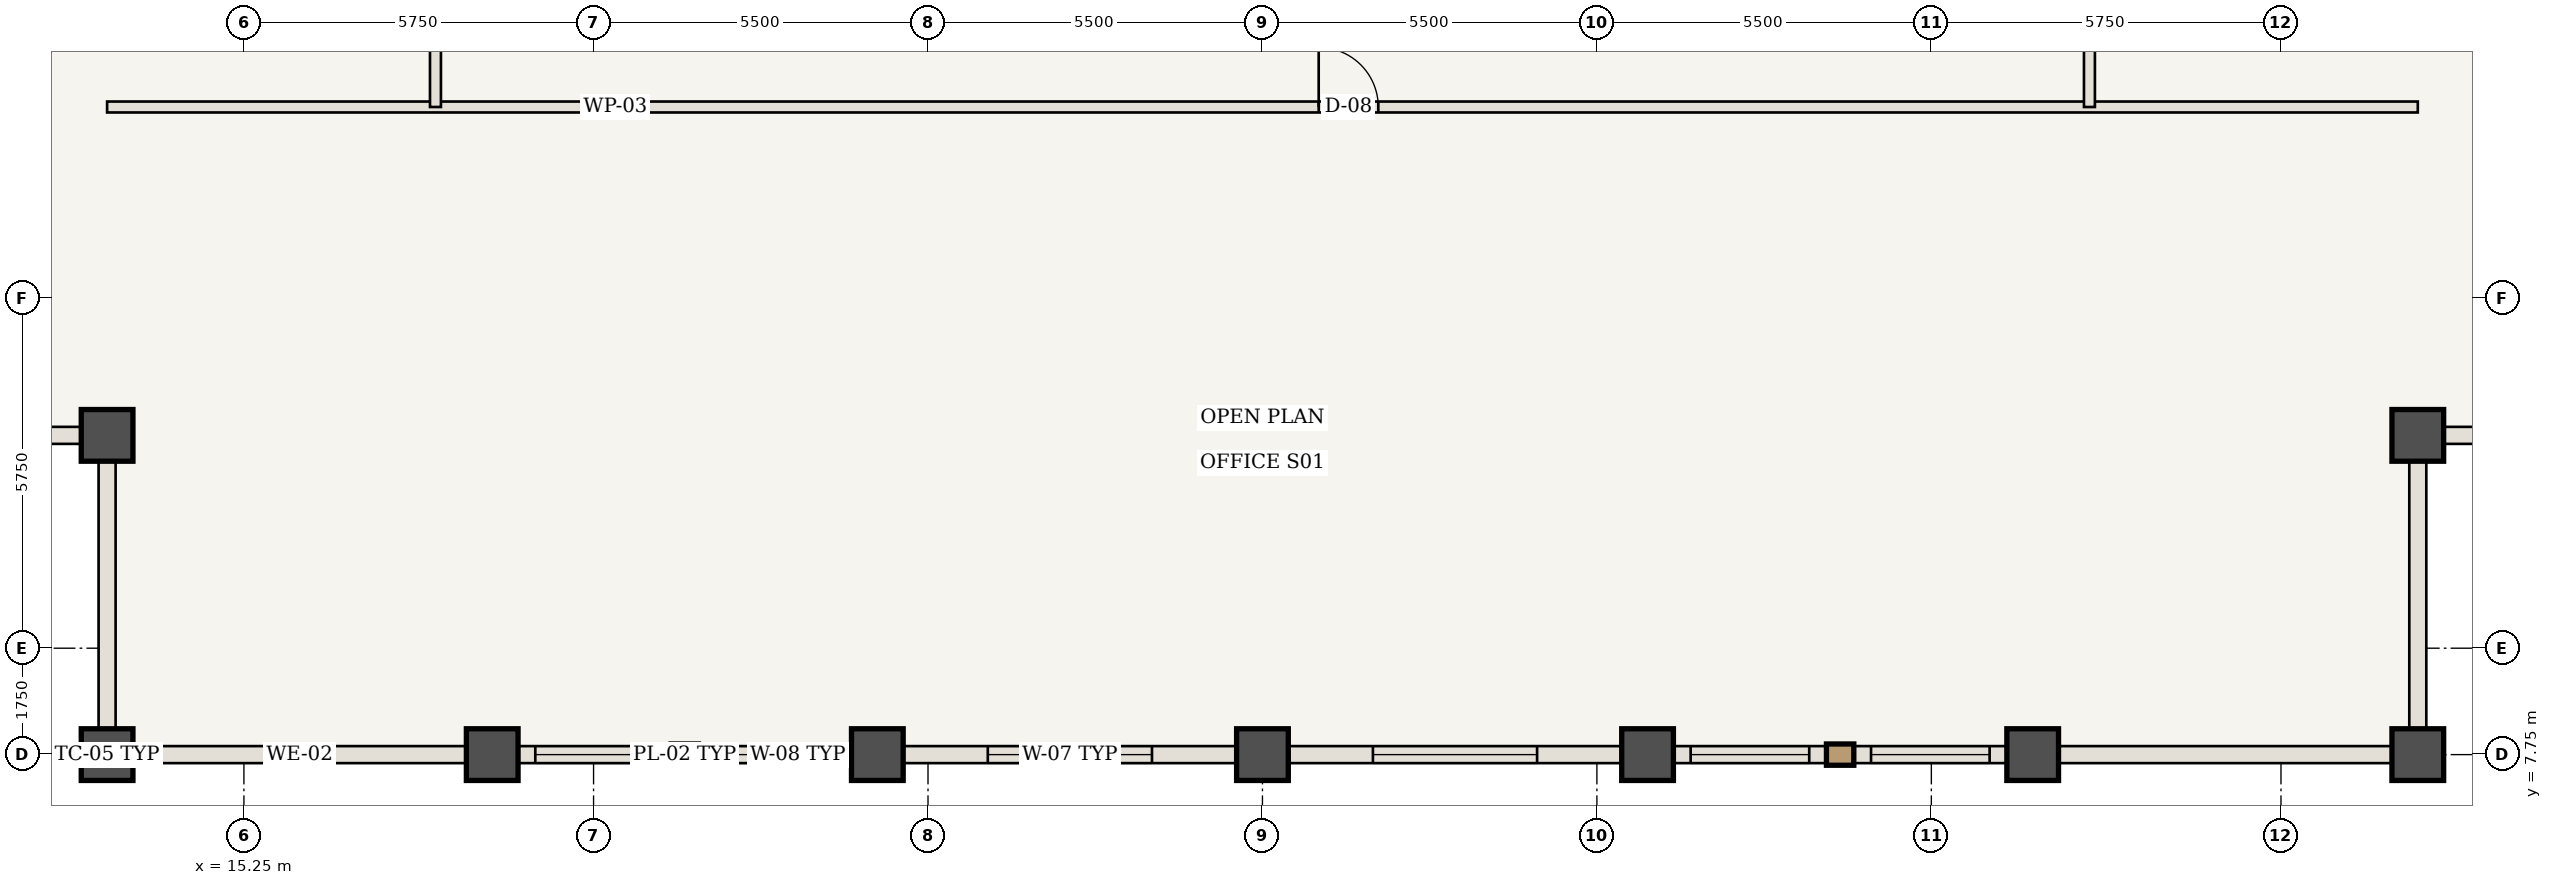
"""IFC4 building model, lengths in metres.
Left out: names, types, materials, properties, quantities, classifications, styles, units other than length and angle.
Written with IfcOpenShell. Run it as: python <this file> out.ifc"""

import sys

from ifc_helpers import new_model, si_unit, direction, frame, frame_2d, origin, origin_2d, place, context, subcontext, project, spatial, rectangle, extrude, element, fill, save


model = new_model("IFC4")
c1 = context("Model", 3, precision=1e-05, world=origin(), true_north=direction((0.0, 1.0)))
c2 = subcontext(c1, "Body", "Model", "MODEL_VIEW")
j1 = project(units=[si_unit("LENGTHUNIT", "METRE"), si_unit("PLANEANGLEUNIT", "RADIAN")], contexts=[c1])
p1 = place(None, origin())
s1 = spatial("IfcSite", under=j1, at=p1, CompositionType="ELEMENT")
p2 = place(p1, origin())
s2 = spatial("IfcBuilding", under=s1, at=p2, CompositionType="ELEMENT")
p3 = place(p2, frame((0.0, 0.0, 190.75)))
s3 = spatial("IfcBuildingStorey", under=s2, at=p3, CompositionType="ELEMENT", Elevation=190.75)
for number, where, z_axis, x_axis in (
    (1, (13.0, 7.75, 0.0), (0.0, 0.0, 1.0), (1.0, 0.0, 0.0)),
    (2, (13.0, 13.0, 0.0), (0.0, 0.0, 1.0), (1.0, 0.0, 0.0)),
    (3, (51.0, 7.75, 0.0), (0.0, 0.0, 1.0), (1.0, 0.0, 0.0)),
    (4, (51.0, 13.0, 0.0), (0.0, 0.0, 1.0), (1.0, 0.0, 0.0)),
    (5, (19.333, 7.75, 0.0), (0.0, 0.0, 1.0), (1.0, 0.0, 0.0)),
    (6, (25.667, 7.75, 0.0), (0.0, 0.0, 1.0), (1.0, 0.0, 0.0)),
    (7, (32.0, 7.75, 0.0), (0.0, 0.0, 1.0), (1.0, 0.0, 0.0)),
    (8, (38.333, 7.75, 0.0), (0.0, 0.0, 1.0), (1.0, 0.0, 0.0)),
    (9, (44.667, 7.75, 0.0), (0.0, 0.0, 1.0), (1.0, 0.0, 0.0)),
):
    element("IfcColumn", number, at=place(p3, frame(where, z_axis=z_axis, x_axis=x_axis)), inside=s3, PredefinedType="COLUMN", context=c2, shape_type="SweptSolid", body=[
        extrude(rectangle(XDim=0.85, YDim=0.85, at=origin_2d()), origin(), (0.0, 0.0, 1.0), 3.85),
    ])
p4 = place(p3, frame((13.0, 18.4, 0.0), z_axis=(0.0, 0.0, 1.0), x_axis=(1.0, 0.0, 0.0)))
e10 = element("IfcWall", 10, at=p4, inside=s3, PredefinedType="STANDARD", context=c2, shape_type="SweptSolid", body=[
    extrude(rectangle(XDim=38.0, YDim=0.18, at=frame_2d((19.0, 0.0))), origin(), (0.0, 0.0, 1.0), 3.685),
])
p5 = place(p4, frame((19.925, 0.0, 0.0)))
e11 = element("IfcOpeningElement", 11, at=p5, cuts=e10, PredefinedType="OPENING", context=c2, shape_type="SweptSolid", body=[
    extrude(rectangle(XDim=0.98, YDim=2.2, at=frame_2d((0.49, 1.1))), frame((0.0, 0.1, 0.0), z_axis=(0.0, -1.0, 0.0), x_axis=(1.0, 0.0, 0.0)), (0.0, 0.0, 1.0), 0.2),
])
p6 = place(p3, frame((18.4, 18.4, 0.0), z_axis=(0.0, 0.0, 1.0), x_axis=(0.0, 1.0, 0.0)))
e12 = element("IfcWall", 12, at=p6, inside=s3, PredefinedType="STANDARD", context=c2, shape_type="SweptSolid", body=[
    extrude(rectangle(XDim=6.317, YDim=0.18, at=frame_2d((3.158, 0.0))), origin(), (0.0, 0.0, 1.0), 3.685),
])
p7 = place(p6, frame((1.208, 0.0, 0.0)))
e13 = element("IfcOpeningElement", 13, at=p7, cuts=e12, PredefinedType="OPENING", context=c2, shape_type="SweptSolid", body=[
    extrude(rectangle(XDim=0.98, YDim=2.2, at=frame_2d((0.49, 1.1))), frame((0.0, 0.1, 0.0), z_axis=(0.0, -1.0, 0.0), x_axis=(1.0, 0.0, 0.0)), (0.0, 0.0, 1.0), 0.2),
])
p8 = place(p3, frame((45.6, 18.4, 0.0), z_axis=(0.0, 0.0, 1.0), x_axis=(0.0, 1.0, 0.0)))
e14 = element("IfcWall", 14, at=p8, inside=s3, PredefinedType="STANDARD", context=c2, shape_type="SweptSolid", body=[
    extrude(rectangle(XDim=13.4, YDim=0.18, at=frame_2d((6.7, 0.0))), origin(), (0.0, 0.0, 1.0), 3.685),
])
p9 = place(p8, frame((6.2, 0.0, 0.0)))
e15 = element("IfcOpeningElement", 15, at=p9, cuts=e14, PredefinedType="OPENING", context=c2, shape_type="SweptSolid", body=[
    extrude(rectangle(XDim=0.98, YDim=2.2, at=frame_2d((0.49, 1.1))), frame((0.0, 0.1, 0.0), z_axis=(0.0, -1.0, 0.0), x_axis=(1.0, 0.0, 0.0)), (0.0, 0.0, 1.0), 0.2),
])
p10 = place(p3, frame((19.333, 7.75, 0.0), z_axis=(0.0, 0.0, 1.0), x_axis=(-1.0, 0.0, 0.0)))
e16 = element("IfcWall", 16, at=p10, inside=s3, PredefinedType="USERDEFINED", context=c2, shape_type="SweptSolid", body=[
    extrude(rectangle(XDim=6.333, YDim=0.28, at=frame_2d((3.167, 0.0))), origin(), (0.0, 0.0, 1.0), 2.985),
])
p11 = place(p3, frame((25.667, 7.75, 0.0), z_axis=(0.0, 0.0, 1.0), x_axis=(-1.0, 0.0, 0.0)))
e17 = element("IfcWall", 17, at=p11, inside=s3, PredefinedType="USERDEFINED", context=c2, shape_type="SweptSolid", body=[
    extrude(rectangle(XDim=6.333, YDim=0.28, at=frame_2d((3.167, 0.0))), origin(), (0.0, 0.0, 1.0), 2.985),
])
p12 = place(p11, frame((0.708, 0.0, 0.85)))
e18 = element("IfcOpeningElement", 18, at=p12, cuts=e17, PredefinedType="OPENING", context=c2, shape_type="SweptSolid", body=[
    extrude(rectangle(XDim=1.95, YDim=1.935, at=frame_2d((0.975, 0.968))), frame((0.0, 0.15, 0.0), z_axis=(0.0, -1.0, 0.0), x_axis=(1.0, 0.0, 0.0)), (0.0, 0.0, 1.0), 0.3),
])
p13 = place(p11, frame((3.675, 0.0, 0.85)))
e19 = element("IfcOpeningElement", 19, at=p13, cuts=e17, PredefinedType="OPENING", context=c2, shape_type="SweptSolid", body=[
    extrude(rectangle(XDim=1.95, YDim=1.935, at=frame_2d((0.975, 0.968))), frame((0.0, 0.15, 0.0), z_axis=(0.0, -1.0, 0.0), x_axis=(1.0, 0.0, 0.0)), (0.0, 0.0, 1.0), 0.3),
])
p14 = place(p3, frame((32.0, 7.75, 0.0), z_axis=(0.0, 0.0, 1.0), x_axis=(-1.0, 0.0, 0.0)))
e20 = element("IfcWall", 20, at=p14, inside=s3, PredefinedType="USERDEFINED", context=c2, shape_type="SweptSolid", body=[
    extrude(rectangle(XDim=6.333, YDim=0.28, at=frame_2d((3.167, 0.0))), origin(), (0.0, 0.0, 1.0), 2.985),
])
p15 = place(p14, frame((1.817, 0.0, 0.85)))
e21 = element("IfcOpeningElement", 21, at=p15, cuts=e20, PredefinedType="OPENING", context=c2, shape_type="SweptSolid", body=[
    extrude(rectangle(XDim=2.7, YDim=1.935, at=frame_2d((1.35, 0.968))), frame((0.0, 0.15, 0.0), z_axis=(0.0, -1.0, 0.0), x_axis=(1.0, 0.0, 0.0)), (0.0, 0.0, 1.0), 0.3),
])
p16 = place(p3, frame((38.333, 7.75, 0.0), z_axis=(0.0, 0.0, 1.0), x_axis=(-1.0, 0.0, 0.0)))
e22 = element("IfcWall", 22, at=p16, inside=s3, PredefinedType="USERDEFINED", context=c2, shape_type="SweptSolid", body=[
    extrude(rectangle(XDim=6.333, YDim=0.28, at=frame_2d((3.167, 0.0))), origin(), (0.0, 0.0, 1.0), 2.985),
])
p17 = place(p16, frame((1.817, 0.0, 0.85)))
e23 = element("IfcOpeningElement", 23, at=p17, cuts=e22, PredefinedType="OPENING", context=c2, shape_type="SweptSolid", body=[
    extrude(rectangle(XDim=2.7, YDim=1.935, at=frame_2d((1.35, 0.968))), frame((0.0, 0.15, 0.0), z_axis=(0.0, -1.0, 0.0), x_axis=(1.0, 0.0, 0.0)), (0.0, 0.0, 1.0), 0.3),
])
p18 = place(p3, frame((44.667, 7.75, 0.0), z_axis=(0.0, 0.0, 1.0), x_axis=(-1.0, 0.0, 0.0)))
e24 = element("IfcWall", 24, at=p18, inside=s3, PredefinedType="USERDEFINED", context=c2, shape_type="SweptSolid", body=[
    extrude(rectangle(XDim=6.333, YDim=0.28, at=frame_2d((3.167, 0.0))), origin(), (0.0, 0.0, 1.0), 2.985),
])
p19 = place(p18, frame((0.708, 0.0, 0.85)))
e25 = element("IfcOpeningElement", 25, at=p19, cuts=e24, PredefinedType="OPENING", context=c2, shape_type="SweptSolid", body=[
    extrude(rectangle(XDim=1.95, YDim=1.935, at=frame_2d((0.975, 0.968))), frame((0.0, 0.15, 0.0), z_axis=(0.0, -1.0, 0.0), x_axis=(1.0, 0.0, 0.0)), (0.0, 0.0, 1.0), 0.3),
])
p20 = place(p18, frame((3.675, 0.0, 0.85)))
e26 = element("IfcOpeningElement", 26, at=p20, cuts=e24, PredefinedType="OPENING", context=c2, shape_type="SweptSolid", body=[
    extrude(rectangle(XDim=1.95, YDim=1.935, at=frame_2d((0.975, 0.968))), frame((0.0, 0.15, 0.0), z_axis=(0.0, -1.0, 0.0), x_axis=(1.0, 0.0, 0.0)), (0.0, 0.0, 1.0), 0.3),
])
p21 = place(p3, frame((51.0, 7.75, 0.0), z_axis=(0.0, 0.0, 1.0), x_axis=(-1.0, 0.0, 0.0)))
e27 = element("IfcWall", 27, at=p21, inside=s3, PredefinedType="USERDEFINED", context=c2, shape_type="SweptSolid", body=[
    extrude(rectangle(XDim=6.333, YDim=0.28, at=frame_2d((3.167, 0.0))), origin(), (0.0, 0.0, 1.0), 2.985),
])
for number, where, z_axis, x_axis in (
    (28, (13.0, 7.75, 0.0), (0.0, 0.0, 1.0), (0.0, 1.0, 0.0)),
    (29, (13.0, 13.0, 0.0), (0.0, 0.0, 1.0), (-1.0, 0.0, 0.0)),
    (30, (51.0, 13.0, 0.0), (0.0, 0.0, 1.0), (0.0, -1.0, 0.0)),
    (31, (56.25, 13.0, 0.0), (0.0, 0.0, 1.0), (-1.0, 0.0, 0.0)),
):
    element("IfcWall", number, at=place(p3, frame(where, z_axis=z_axis, x_axis=x_axis)), inside=s3, PredefinedType="USERDEFINED", context=c2, shape_type="SweptSolid", body=[
        extrude(rectangle(XDim=5.25, YDim=0.28, at=frame_2d((2.625, 0.0))), origin(), (0.0, 0.0, 1.0), 2.985),
    ])
p22 = place(p5, origin())
e32 = element("IfcDoor", 32, at=p22, inside=s3, OperationType="SINGLE_SWING_LEFT", PredefinedType="DOOR", context=c2, shape_type="SweptSolid", body=[
    extrude(rectangle(XDim=0.98, YDim=2.2, at=frame_2d((0.49, 1.1))), frame((0.0, 0.025, 0.0), z_axis=(0.0, -1.0, 0.0), x_axis=(1.0, 0.0, 0.0)), (0.0, 0.0, 1.0), 0.05),
])
fill(e11, e32)
p23 = place(p12, origin())
e33 = element("IfcWindow", 33, at=p23, inside=s3, PartitioningType="SINGLE_PANEL", PredefinedType="WINDOW", context=c2, shape_type="SweptSolid", body=[
    extrude(rectangle(XDim=1.95, YDim=1.935, at=frame_2d((0.975, 0.968))), frame((0.0, 0.03, 0.0), z_axis=(0.0, -1.0, 0.0), x_axis=(1.0, 0.0, 0.0)), (0.0, 0.0, 1.0), 0.06),
])
fill(e18, e33)
p24 = place(p13, origin())
e34 = element("IfcWindow", 34, at=p24, inside=s3, PartitioningType="SINGLE_PANEL", PredefinedType="WINDOW", context=c2, shape_type="SweptSolid", body=[
    extrude(rectangle(XDim=1.95, YDim=1.935, at=frame_2d((0.975, 0.968))), frame((0.0, 0.03, 0.0), z_axis=(0.0, -1.0, 0.0), x_axis=(1.0, 0.0, 0.0)), (0.0, 0.0, 1.0), 0.06),
])
fill(e19, e34)
p25 = place(p15, origin())
e35 = element("IfcWindow", 35, at=p25, inside=s3, PartitioningType="SINGLE_PANEL", PredefinedType="WINDOW", context=c2, shape_type="SweptSolid", body=[
    extrude(rectangle(XDim=2.7, YDim=1.935, at=frame_2d((1.35, 0.968))), frame((0.0, 0.03, 0.0), z_axis=(0.0, -1.0, 0.0), x_axis=(1.0, 0.0, 0.0)), (0.0, 0.0, 1.0), 0.06),
])
fill(e21, e35)
p26 = place(p17, origin())
e36 = element("IfcWindow", 36, at=p26, inside=s3, PartitioningType="SINGLE_PANEL", PredefinedType="WINDOW", context=c2, shape_type="SweptSolid", body=[
    extrude(rectangle(XDim=2.7, YDim=1.935, at=frame_2d((1.35, 0.968))), frame((0.0, 0.03, 0.0), z_axis=(0.0, -1.0, 0.0), x_axis=(1.0, 0.0, 0.0)), (0.0, 0.0, 1.0), 0.06),
])
fill(e23, e36)
p27 = place(p19, origin())
e37 = element("IfcWindow", 37, at=p27, inside=s3, PartitioningType="SINGLE_PANEL", PredefinedType="WINDOW", context=c2, shape_type="SweptSolid", body=[
    extrude(rectangle(XDim=1.95, YDim=1.935, at=frame_2d((0.975, 0.968))), frame((0.0, 0.03, 0.0), z_axis=(0.0, -1.0, 0.0), x_axis=(1.0, 0.0, 0.0)), (0.0, 0.0, 1.0), 0.06),
])
fill(e25, e37)
p28 = place(p20, origin())
e38 = element("IfcWindow", 38, at=p28, inside=s3, PartitioningType="SINGLE_PANEL", PredefinedType="WINDOW", context=c2, shape_type="SweptSolid", body=[
    extrude(rectangle(XDim=1.95, YDim=1.935, at=frame_2d((0.975, 0.968))), frame((0.0, 0.03, 0.0), z_axis=(0.0, -1.0, 0.0), x_axis=(1.0, 0.0, 0.0)), (0.0, 0.0, 1.0), 0.06),
])
fill(e26, e38)
save(model, sys.argv[1])
